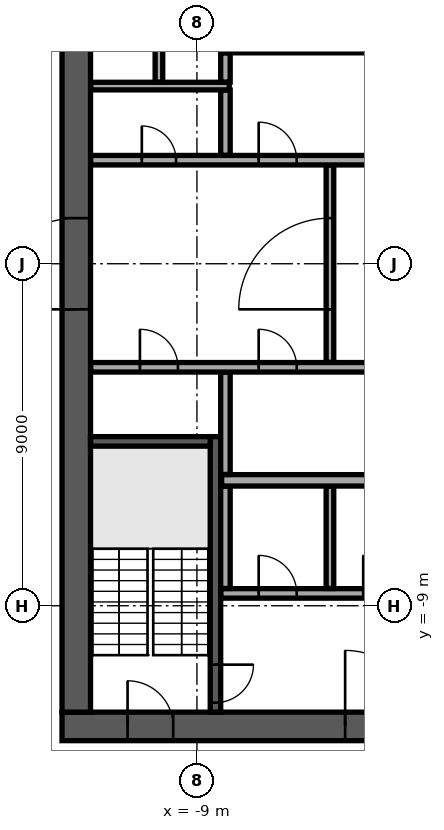
"""IFC4 building model, lengths in metres.
Left out: names, types, materials, properties, quantities, classifications, styles, units other than length and angle.
Written with IfcOpenShell. Run it as: python <this file> out.ifc"""

import sys

from ifc_helpers import new_model, si_unit, direction, frame, frame_2d, origin, place, context, subcontext, project, spatial, rectangle, extrude, element, fill, save


model = new_model("IFC4")
c1 = context("Model", 3, precision=1e-05, world=origin(), true_north=direction((0.0, 1.0)))
c2 = subcontext(c1, "Body", "Model", "MODEL_VIEW")
j1 = project(units=[si_unit("LENGTHUNIT", "METRE"), si_unit("PLANEANGLEUNIT", "RADIAN")], contexts=[c1])
p1 = place(None, origin())
s1 = spatial("IfcSite", under=j1, at=p1, CompositionType="ELEMENT")
p2 = place(p1, origin())
s2 = spatial("IfcBuilding", under=s1, at=p2, CompositionType="ELEMENT")
p3 = place(p2, frame((0.0, 0.0, 262.9)))
s3 = spatial("IfcBuildingStorey", under=s2, at=p3, CompositionType="ELEMENT", Elevation=262.9)
p4 = place(p3, frame((-12.55, -12.175, 0.0), z_axis=(0.0, 0.0, 1.0), x_axis=(1.0, 0.0, 0.0)))
e1 = element("IfcWall", 1, at=p4, inside=s3, PredefinedType="SHEAR", context=c2, shape_type="SweptSolid", body=[
    extrude(rectangle(XDim=25.1, YDim=0.75, at=frame_2d((12.55, 0.0))), origin(), (0.0, 0.0, 1.0), 3.64),
])
p5 = place(p4, frame((7.45, 0.0, 0.0)))
e2 = element("IfcOpeningElement", 2, at=p5, cuts=e1, PredefinedType="OPENING", context=c2, shape_type="SweptSolid", body=[
    extrude(rectangle(XDim=2.0, YDim=2.1, at=frame_2d((1.0, 1.05))), frame((0.0, 0.385, 0.0), z_axis=(0.0, -1.0, 0.0), x_axis=(1.0, 0.0, 0.0)), (0.0, 0.0, 1.0), 0.77),
])
p6 = place(p4, frame((17.575, 0.0, 0.0)))
e3 = element("IfcOpeningElement", 3, at=p6, cuts=e1, PredefinedType="OPENING", context=c2, shape_type="SweptSolid", body=[
    extrude(rectangle(XDim=1.2, YDim=2.1, at=frame_2d((0.6, 1.05))), frame((0.0, 0.385, 0.0), z_axis=(0.0, -1.0, 0.0), x_axis=(1.0, 0.0, 0.0)), (0.0, 0.0, 1.0), 0.77),
])
p7 = place(p4, frame((1.725, 0.0, 0.0)))
e4 = element("IfcOpeningElement", 4, at=p7, cuts=e1, PredefinedType="OPENING", context=c2, shape_type="SweptSolid", body=[
    extrude(rectangle(XDim=1.2, YDim=2.1, at=frame_2d((0.6, 1.05))), frame((0.0, 0.385, 0.0), z_axis=(0.0, -1.0, 0.0), x_axis=(1.0, 0.0, 0.0)), (0.0, 0.0, 1.0), 0.77),
])
p8 = place(p4, frame((22.175, 0.0, 0.0)))
e5 = element("IfcOpeningElement", 5, at=p8, cuts=e1, PredefinedType="OPENING", context=c2, shape_type="SweptSolid", body=[
    extrude(rectangle(XDim=1.2, YDim=2.1, at=frame_2d((0.6, 1.05))), frame((0.0, 0.385, 0.0), z_axis=(0.0, -1.0, 0.0), x_axis=(1.0, 0.0, 0.0)), (0.0, 0.0, 1.0), 0.77),
])
p9 = place(p3, frame((-12.175, -11.8, 0.0), z_axis=(0.0, 0.0, 1.0), x_axis=(0.0, 1.0, 0.0)))
e6 = element("IfcWall", 6, at=p9, inside=s3, PredefinedType="SHEAR", context=c2, shape_type="SweptSolid", body=[
    extrude(rectangle(XDim=23.6, YDim=0.75, at=frame_2d((11.8, 0.0))), origin(), (0.0, 0.0, 1.0), 3.64),
])
p10 = place(p9, frame((10.6, 0.0, 0.0)))
e7 = element("IfcOpeningElement", 7, at=p10, cuts=e6, PredefinedType="OPENING", context=c2, shape_type="SweptSolid", body=[
    extrude(rectangle(XDim=2.4, YDim=2.4, at=frame_2d((1.2, 1.2))), frame((0.0, 0.385, 0.0), z_axis=(0.0, -1.0, 0.0), x_axis=(1.0, 0.0, 0.0)), (0.0, 0.0, 1.0), 0.77),
])
p11 = place(p3, frame((-8.375, 5.7, 0.0), z_axis=(0.0, 0.0, 1.0), x_axis=(1.0, 0.0, 0.0)))
e8 = element("IfcWall", 8, at=p11, inside=s3, PredefinedType="SOLIDWALL", context=c2, shape_type="SweptSolid", body=[
    extrude(rectangle(XDim=16.75, YDim=0.3, at=frame_2d((8.375, 0.0))), origin(), (0.0, 0.0, 1.0), 3.64),
])
p12 = place(p3, frame((-8.512, -4.55, 0.0), z_axis=(0.0, 0.0, 1.0), x_axis=(0.0, -1.0, 0.0)))
e9 = element("IfcWall", 9, at=p12, inside=s3, PredefinedType="SOLIDWALL", context=c2, shape_type="SweptSolid", body=[
    extrude(rectangle(XDim=7.25, YDim=0.275, at=frame_2d((3.625, 0.0))), origin(), (0.0, 0.0, 1.0), 3.64),
])
p13 = place(p12, frame((6.0, 0.0, 0.0)))
e10 = element("IfcOpeningElement", 10, at=p13, cuts=e9, PredefinedType="OPENING", context=c2, shape_type="SweptSolid", body=[
    extrude(rectangle(XDim=1.0, YDim=2.1, at=frame_2d((0.5, 1.05))), frame((0.0, 0.147, 0.0), z_axis=(0.0, -1.0, 0.0), x_axis=(1.0, 0.0, 0.0)), (0.0, 0.0, 1.0), 0.295),
])
p14 = place(p3, frame((-8.65, -4.675, 0.0), z_axis=(0.0, 0.0, 1.0), x_axis=(-1.0, 0.0, 0.0)))
e11 = element("IfcWall", 11, at=p14, inside=s3, PredefinedType="SOLIDWALL", context=c2, shape_type="SweptSolid", body=[
    extrude(rectangle(XDim=3.15, YDim=0.25, at=frame_2d((1.575, 0.0))), origin(), (0.0, 0.0, 1.0), 3.64),
])
p15 = place(p3, frame((-8.37, -8.675, 0.0), z_axis=(0.0, 0.0, 1.0), x_axis=(1.0, 0.0, 0.0)))
e12 = element("IfcWall", 12, at=p15, inside=s3, PredefinedType="PARTITIONING", context=c2, shape_type="SweptSolid", body=[
    extrude(rectangle(XDim=5.49, YDim=0.25, at=frame_2d((2.745, 0.0))), origin(), (0.0, 0.0, 1.0), 3.64),
])
p16 = place(p15, frame((0.995, 0.0, 0.0)))
e13 = element("IfcOpeningElement", 13, at=p16, cuts=e12, PredefinedType="OPENING", context=c2, shape_type="SweptSolid", body=[
    extrude(rectangle(XDim=1.0, YDim=2.1, at=frame_2d((0.5, 1.05))), frame((0.0, 0.135, 0.0), z_axis=(0.0, -1.0, 0.0), x_axis=(1.0, 0.0, 0.0)), (0.0, 0.0, 1.0), 0.27),
])
p17 = place(p15, frame((3.745, 0.0, 0.0)))
e14 = element("IfcOpeningElement", 14, at=p17, cuts=e12, PredefinedType="OPENING", context=c2, shape_type="SweptSolid", body=[
    extrude(rectangle(XDim=1.0, YDim=2.1, at=frame_2d((0.5, 1.05))), frame((0.0, 0.135, 0.0), z_axis=(0.0, -1.0, 0.0), x_axis=(1.0, 0.0, 0.0)), (0.0, 0.0, 1.0), 0.27),
])
p18 = place(p3, frame((-8.25, -8.545, 0.0), z_axis=(0.0, 0.0, 1.0), x_axis=(0.0, 1.0, 0.0)))
e15 = element("IfcWall", 15, at=p18, inside=s3, PredefinedType="PARTITIONING", context=c2, shape_type="SweptSolid", body=[
    extrude(rectangle(XDim=2.69, YDim=0.25, at=frame_2d((1.345, 0.0))), origin(), (0.0, 0.0, 1.0), 3.64),
])
p19 = place(p3, frame((-5.5, -8.545, 0.0), z_axis=(0.0, 0.0, 1.0), x_axis=(0.0, 1.0, 0.0)))
e16 = element("IfcWall", 16, at=p19, inside=s3, PredefinedType="PARTITIONING", context=c2, shape_type="SweptSolid", body=[
    extrude(rectangle(XDim=2.69, YDim=0.2, at=frame_2d((1.345, 0.0))), origin(), (0.0, 0.0, 1.0), 3.64),
])
p20 = place(p3, frame((-8.35, -5.7, 0.0), z_axis=(0.0, 0.0, 1.0), x_axis=(1.0, 0.0, 0.0)))
e17 = element("IfcWall", 17, at=p20, inside=s3, PredefinedType="PARTITIONING", context=c2, shape_type="SweptSolid", body=[
    extrude(rectangle(XDim=5.47, YDim=0.3, at=frame_2d((2.735, 0.0))), origin(), (0.0, 0.0, 1.0), 3.64),
])
p21 = place(p3, frame((-8.25, -5.545, 0.0), z_axis=(0.0, 0.0, 1.0), x_axis=(0.0, 1.0, 0.0)))
e18 = element("IfcWall", 18, at=p21, inside=s3, PredefinedType="PARTITIONING", context=c2, shape_type="SweptSolid", body=[
    extrude(rectangle(XDim=2.69, YDim=0.25, at=frame_2d((1.345, 0.0))), origin(), (0.0, 0.0, 1.0), 3.64),
])
p22 = place(p3, frame((-11.795, -2.725, 0.0), z_axis=(0.0, 0.0, 1.0), x_axis=(1.0, 0.0, 0.0)))
e19 = element("IfcWall", 19, at=p22, inside=s3, PredefinedType="PARTITIONING", context=c2, shape_type="SweptSolid", body=[
    extrude(rectangle(XDim=14.415, YDim=0.25, at=frame_2d((7.208, 0.0))), origin(), (0.0, 0.0, 1.0), 3.64),
])
p23 = place(p22, frame((1.295, 0.0, 0.0)))
e20 = element("IfcOpeningElement", 20, at=p23, cuts=e19, PredefinedType="OPENING", context=c2, shape_type="SweptSolid", body=[
    extrude(rectangle(XDim=1.0, YDim=2.1, at=frame_2d((0.5, 1.05))), frame((0.0, 0.135, 0.0), z_axis=(0.0, -1.0, 0.0), x_axis=(1.0, 0.0, 0.0)), (0.0, 0.0, 1.0), 0.27),
])
p24 = place(p22, frame((4.42, 0.0, 0.0)))
e21 = element("IfcOpeningElement", 21, at=p24, cuts=e19, PredefinedType="OPENING", context=c2, shape_type="SweptSolid", body=[
    extrude(rectangle(XDim=1.0, YDim=2.1, at=frame_2d((0.5, 1.05))), frame((0.0, 0.135, 0.0), z_axis=(0.0, -1.0, 0.0), x_axis=(1.0, 0.0, 0.0)), (0.0, 0.0, 1.0), 0.27),
])
p25 = place(p22, frame((9.92, 0.0, 0.0)))
e22 = element("IfcOpeningElement", 22, at=p25, cuts=e19, PredefinedType="OPENING", context=c2, shape_type="SweptSolid", body=[
    extrude(rectangle(XDim=1.0, YDim=2.1, at=frame_2d((0.5, 1.05))), frame((0.0, 0.135, 0.0), z_axis=(0.0, -1.0, 0.0), x_axis=(1.0, 0.0, 0.0)), (0.0, 0.0, 1.0), 0.27),
])
p26 = place(p3, frame((-5.5, -2.595, 0.0), z_axis=(0.0, 0.0, 1.0), x_axis=(0.0, 1.0, 0.0)))
e23 = element("IfcWall", 23, at=p26, inside=s3, PredefinedType="PARTITIONING", context=c2, shape_type="SweptSolid", body=[
    extrude(rectangle(XDim=5.19, YDim=0.2, at=frame_2d((2.595, 0.0))), origin(), (0.0, 0.0, 1.0), 3.64),
])
p27 = place(p26, frame((1.395, 0.0, 0.0)))
e24 = element("IfcOpeningElement", 24, at=p27, cuts=e23, PredefinedType="OPENING", context=c2, shape_type="SweptSolid", body=[
    extrude(rectangle(XDim=2.4, YDim=2.4, at=frame_2d((1.2, 1.2))), frame((0.0, 0.11, 0.0), z_axis=(0.0, -1.0, 0.0), x_axis=(1.0, 0.0, 0.0)), (0.0, 0.0, 1.0), 0.22),
])
p28 = place(p3, frame((-11.795, 2.725, 0.0), z_axis=(0.0, 0.0, 1.0), x_axis=(1.0, 0.0, 0.0)))
e25 = element("IfcWall", 25, at=p28, inside=s3, PredefinedType="PARTITIONING", context=c2, shape_type="SweptSolid", body=[
    extrude(rectangle(XDim=23.59, YDim=0.25, at=frame_2d((11.795, 0.0))), origin(), (0.0, 0.0, 1.0), 3.64),
])
p29 = place(p28, frame((21.345, 0.0, 0.0)))
e26 = element("IfcOpeningElement", 26, at=p29, cuts=e25, PredefinedType="OPENING", context=c2, shape_type="SweptSolid", body=[
    extrude(rectangle(XDim=0.9, YDim=2.1, at=frame_2d((0.45, 1.05))), frame((0.0, 0.135, 0.0), z_axis=(0.0, -1.0, 0.0), x_axis=(1.0, 0.0, 0.0)), (0.0, 0.0, 1.0), 0.27),
])
p30 = place(p28, frame((1.345, 0.0, 0.0)))
e27 = element("IfcOpeningElement", 27, at=p30, cuts=e25, PredefinedType="OPENING", context=c2, shape_type="SweptSolid", body=[
    extrude(rectangle(XDim=0.9, YDim=2.1, at=frame_2d((0.45, 1.05))), frame((0.0, 0.135, 0.0), z_axis=(0.0, -1.0, 0.0), x_axis=(1.0, 0.0, 0.0)), (0.0, 0.0, 1.0), 0.27),
])
p31 = place(p28, frame((4.42, 0.0, 0.0)))
e28 = element("IfcOpeningElement", 28, at=p31, cuts=e25, PredefinedType="OPENING", context=c2, shape_type="SweptSolid", body=[
    extrude(rectangle(XDim=1.0, YDim=2.1, at=frame_2d((0.5, 1.05))), frame((0.0, 0.135, 0.0), z_axis=(0.0, -1.0, 0.0), x_axis=(1.0, 0.0, 0.0)), (0.0, 0.0, 1.0), 0.27),
])
p32 = place(p28, frame((9.82, 0.0, 0.0)))
e29 = element("IfcOpeningElement", 29, at=p32, cuts=e25, PredefinedType="OPENING", context=c2, shape_type="SweptSolid", body=[
    extrude(rectangle(XDim=1.2, YDim=2.1, at=frame_2d((0.6, 1.05))), frame((0.0, 0.135, 0.0), z_axis=(0.0, -1.0, 0.0), x_axis=(1.0, 0.0, 0.0)), (0.0, 0.0, 1.0), 0.27),
])
p33 = place(p3, frame((-8.25, 2.855, 0.0), z_axis=(0.0, 0.0, 1.0), x_axis=(0.0, 1.0, 0.0)))
e30 = element("IfcWall", 30, at=p33, inside=s3, PredefinedType="PARTITIONING", context=c2, shape_type="SweptSolid", body=[
    extrude(rectangle(XDim=1.715, YDim=0.25, at=frame_2d((0.857, 0.0))), origin(), (0.0, 0.0, 1.0), 3.64),
])
p34 = place(p3, frame((-11.795, 4.675, 0.0), z_axis=(0.0, 0.0, 1.0), x_axis=(1.0, 0.0, 0.0)))
e31 = element("IfcWall", 31, at=p34, inside=s3, PredefinedType="PARTITIONING", context=c2, shape_type="SweptSolid", body=[
    extrude(rectangle(XDim=3.645, YDim=0.2, at=frame_2d((1.823, 0.0))), origin(), (0.0, 0.0, 1.0), 3.64),
])
p35 = place(p3, frame((-10.0, 4.78, 0.0), z_axis=(0.0, 0.0, 1.0), x_axis=(0.0, 1.0, 0.0)))
e32 = element("IfcWall", 32, at=p35, inside=s3, PredefinedType="PARTITIONING", context=c2, shape_type="SweptSolid", body=[
    extrude(rectangle(XDim=7.015, YDim=0.2, at=frame_2d((3.507, 0.0))), origin(), (0.0, 0.0, 1.0), 3.64),
])
p36 = place(p35, frame((2.92, 0.0, 0.0)))
e33 = element("IfcOpeningElement", 33, at=p36, cuts=e32, PredefinedType="OPENING", context=c2, shape_type="SweptSolid", body=[
    extrude(rectangle(XDim=1.0, YDim=2.1, at=frame_2d((0.5, 1.05))), frame((0.0, 0.11, 0.0), z_axis=(0.0, -1.0, 0.0), x_axis=(1.0, 0.0, 0.0)), (0.0, 0.0, 1.0), 0.22),
])
p37 = place(p3, frame((-8.25, 4.78, 0.0), z_axis=(0.0, 0.0, 1.0), x_axis=(0.0, 1.0, 0.0)))
e34 = element("IfcWall", 34, at=p37, inside=s3, PredefinedType="PARTITIONING", context=c2, shape_type="SweptSolid", body=[
    extrude(rectangle(XDim=0.765, YDim=0.25, at=frame_2d((0.382, 0.0))), origin(), (0.0, 0.0, 1.0), 3.64),
])
p38 = place(p3, frame((-8.015, 32.917, 0.0), z_axis=(0.0, 0.0, 1.0), x_axis=(-0.500001675963, -0.866024436165, 0.0)))
e35 = element("IfcWall", 35, at=p38, inside=s3, PredefinedType="STANDARD", context=c2, shape_type="SweptSolid", body=[
    extrude(rectangle(XDim=48.843, YDim=0.6, at=frame_2d((24.421, 0.0))), origin(), (0.0, 0.0, 1.0), 3.64),
])
p39 = place(p38, frame((1.22, 0.0, 0.9)))
e36 = element("IfcOpeningElement", 36, at=p39, cuts=e35, PredefinedType="OPENING", context=c2, shape_type="SweptSolid", body=[
    extrude(rectangle(XDim=2.0, YDim=2.1, at=frame_2d((1.0, 1.05))), frame((0.0, 0.31, 0.0), z_axis=(0.0, -1.0, 0.0), x_axis=(1.0, 0.0, 0.0)), (0.0, 0.0, 1.0), 0.62),
])
p40 = place(p38, frame((5.66, 0.0, 0.9)))
e37 = element("IfcOpeningElement", 37, at=p40, cuts=e35, PredefinedType="OPENING", context=c2, shape_type="SweptSolid", body=[
    extrude(rectangle(XDim=2.0, YDim=2.1, at=frame_2d((1.0, 1.05))), frame((0.0, 0.31, 0.0), z_axis=(0.0, -1.0, 0.0), x_axis=(1.0, 0.0, 0.0)), (0.0, 0.0, 1.0), 0.62),
])
p41 = place(p38, frame((10.101, 0.0, 0.9)))
e38 = element("IfcOpeningElement", 38, at=p41, cuts=e35, PredefinedType="OPENING", context=c2, shape_type="SweptSolid", body=[
    extrude(rectangle(XDim=2.0, YDim=2.1, at=frame_2d((1.0, 1.05))), frame((0.0, 0.31, 0.0), z_axis=(0.0, -1.0, 0.0), x_axis=(1.0, 0.0, 0.0)), (0.0, 0.0, 1.0), 0.62),
])
p42 = place(p38, frame((14.541, 0.0, 0.9)))
e39 = element("IfcOpeningElement", 39, at=p42, cuts=e35, PredefinedType="OPENING", context=c2, shape_type="SweptSolid", body=[
    extrude(rectangle(XDim=2.0, YDim=2.1, at=frame_2d((1.0, 1.05))), frame((0.0, 0.31, 0.0), z_axis=(0.0, -1.0, 0.0), x_axis=(1.0, 0.0, 0.0)), (0.0, 0.0, 1.0), 0.62),
])
p43 = place(p38, frame((18.981, 0.0, 0.9)))
e40 = element("IfcOpeningElement", 40, at=p43, cuts=e35, PredefinedType="OPENING", context=c2, shape_type="SweptSolid", body=[
    extrude(rectangle(XDim=2.0, YDim=2.1, at=frame_2d((1.0, 1.05))), frame((0.0, 0.31, 0.0), z_axis=(0.0, -1.0, 0.0), x_axis=(1.0, 0.0, 0.0)), (0.0, 0.0, 1.0), 0.62),
])
p44 = place(p38, frame((23.422, 0.0, 0.9)))
e41 = element("IfcOpeningElement", 41, at=p44, cuts=e35, PredefinedType="OPENING", context=c2, shape_type="SweptSolid", body=[
    extrude(rectangle(XDim=2.0, YDim=2.1, at=frame_2d((1.0, 1.05))), frame((0.0, 0.31, 0.0), z_axis=(0.0, -1.0, 0.0), x_axis=(1.0, 0.0, 0.0)), (0.0, 0.0, 1.0), 0.62),
])
p45 = place(p38, frame((27.862, 0.0, 0.9)))
e42 = element("IfcOpeningElement", 42, at=p45, cuts=e35, PredefinedType="OPENING", context=c2, shape_type="SweptSolid", body=[
    extrude(rectangle(XDim=2.0, YDim=2.1, at=frame_2d((1.0, 1.05))), frame((0.0, 0.31, 0.0), z_axis=(0.0, -1.0, 0.0), x_axis=(1.0, 0.0, 0.0)), (0.0, 0.0, 1.0), 0.62),
])
p46 = place(p38, frame((32.302, 0.0, 0.9)))
e43 = element("IfcOpeningElement", 43, at=p46, cuts=e35, PredefinedType="OPENING", context=c2, shape_type="SweptSolid", body=[
    extrude(rectangle(XDim=2.0, YDim=2.1, at=frame_2d((1.0, 1.05))), frame((0.0, 0.31, 0.0), z_axis=(0.0, -1.0, 0.0), x_axis=(1.0, 0.0, 0.0)), (0.0, 0.0, 1.0), 0.62),
])
p47 = place(p38, frame((36.742, 0.0, 0.9)))
e44 = element("IfcOpeningElement", 44, at=p47, cuts=e35, PredefinedType="OPENING", context=c2, shape_type="SweptSolid", body=[
    extrude(rectangle(XDim=2.0, YDim=2.1, at=frame_2d((1.0, 1.05))), frame((0.0, 0.31, 0.0), z_axis=(0.0, -1.0, 0.0), x_axis=(1.0, 0.0, 0.0)), (0.0, 0.0, 1.0), 0.62),
])
p48 = place(p38, frame((41.183, 0.0, 0.9)))
e45 = element("IfcOpeningElement", 45, at=p48, cuts=e35, PredefinedType="OPENING", context=c2, shape_type="SweptSolid", body=[
    extrude(rectangle(XDim=2.0, YDim=2.1, at=frame_2d((1.0, 1.05))), frame((0.0, 0.31, 0.0), z_axis=(0.0, -1.0, 0.0), x_axis=(1.0, 0.0, 0.0)), (0.0, 0.0, 1.0), 0.62),
])
p49 = place(p38, frame((45.623, 0.0, 0.9)))
e46 = element("IfcOpeningElement", 46, at=p49, cuts=e35, PredefinedType="OPENING", context=c2, shape_type="SweptSolid", body=[
    extrude(rectangle(XDim=2.0, YDim=2.1, at=frame_2d((1.0, 1.05))), frame((0.0, 0.31, 0.0), z_axis=(0.0, -1.0, 0.0), x_axis=(1.0, 0.0, 0.0)), (0.0, 0.0, 1.0), 0.62),
])
p50 = place(p3, frame((-26.744, -7.073, 0.0), z_axis=(0.0, 0.0, 1.0), x_axis=(0.866020890374, -0.500007817374, 0.0)))
e47 = element("IfcWall", 47, at=p50, inside=s3, PredefinedType="PARTITIONING", context=c2, shape_type="SweptSolid", body=[
    extrude(rectangle(XDim=39.324, YDim=0.15, at=frame_2d((19.662, 0.0))), origin(), (0.0, 0.0, 1.0), 3.04),
])
p51 = place(p50, frame((14.505, 0.0, 0.0)))
e48 = element("IfcOpeningElement", 48, at=p51, cuts=e47, PredefinedType="OPENING", context=c2, shape_type="SweptSolid", body=[
    extrude(rectangle(XDim=1.0, YDim=2.1, at=frame_2d((0.5, 1.05))), frame((0.0, 0.085, 0.0), z_axis=(0.0, -1.0, 0.0), x_axis=(1.0, 0.0, 0.0)), (0.0, 0.0, 1.0), 0.17),
])
p52 = place(p50, frame((22.632, 0.0, 0.0)))
e49 = element("IfcOpeningElement", 49, at=p52, cuts=e47, PredefinedType="OPENING", context=c2, shape_type="SweptSolid", body=[
    extrude(rectangle(XDim=1.0, YDim=2.1, at=frame_2d((0.5, 1.05))), frame((0.0, 0.085, 0.0), z_axis=(0.0, -1.0, 0.0), x_axis=(1.0, 0.0, 0.0)), (0.0, 0.0, 1.0), 0.17),
])
p53 = place(p50, frame((36.852, 0.0, 0.0)))
e50 = element("IfcOpeningElement", 50, at=p53, cuts=e47, PredefinedType="OPENING", context=c2, shape_type="SweptSolid", body=[
    extrude(rectangle(XDim=1.8, YDim=2.1, at=frame_2d((0.9, 1.05))), frame((0.0, 0.085, 0.0), z_axis=(0.0, -1.0, 0.0), x_axis=(1.0, 0.0, 0.0)), (0.0, 0.0, 1.0), 0.17),
])
p54 = place(p50, frame((29.852, 0.0, 0.0)))
e51 = element("IfcOpeningElement", 51, at=p54, cuts=e47, PredefinedType="OPENING", context=c2, shape_type="SweptSolid", body=[
    extrude(rectangle(XDim=1.0, YDim=2.1, at=frame_2d((0.5, 1.05))), frame((0.0, 0.085, 0.0), z_axis=(0.0, -1.0, 0.0), x_axis=(1.0, 0.0, 0.0)), (0.0, 0.0, 1.0), 0.17),
])
p55 = place(p5, origin())
e52 = element("IfcDoor", 52, at=p55, inside=s3, OperationType="SINGLE_SWING_LEFT", PredefinedType="DOOR", context=c2, shape_type="SweptSolid", body=[
    extrude(rectangle(XDim=2.0, YDim=2.1, at=frame_2d((1.0, 1.05))), frame((0.0, 0.025, 0.0), z_axis=(0.0, -1.0, 0.0), x_axis=(1.0, 0.0, 0.0)), (0.0, 0.0, 1.0), 0.05),
])
fill(e2, e52)
p56 = place(p7, origin())
e53 = element("IfcDoor", 53, at=p56, inside=s3, OperationType="SINGLE_SWING_LEFT", PredefinedType="DOOR", context=c2, shape_type="SweptSolid", body=[
    extrude(rectangle(XDim=1.2, YDim=2.1, at=frame_2d((0.6, 1.05))), frame((0.0, 0.025, 0.0), z_axis=(0.0, -1.0, 0.0), x_axis=(1.0, 0.0, 0.0)), (0.0, 0.0, 1.0), 0.05),
])
fill(e4, e53)
p57 = place(p10, origin())
e54 = element("IfcDoor", 54, at=p57, inside=s3, OperationType="SINGLE_SWING_LEFT", PredefinedType="DOOR", context=c2, shape_type="SweptSolid", body=[
    extrude(rectangle(XDim=2.4, YDim=2.4, at=frame_2d((1.2, 1.2))), frame((0.0, 0.025, 0.0), z_axis=(0.0, -1.0, 0.0), x_axis=(1.0, 0.0, 0.0)), (0.0, 0.0, 1.0), 0.05),
])
fill(e7, e54)
p58 = place(p13, origin())
e55 = element("IfcDoor", 55, at=p58, inside=s3, OperationType="SINGLE_SWING_LEFT", PredefinedType="DOOR", context=c2, shape_type="SweptSolid", body=[
    extrude(rectangle(XDim=1.0, YDim=2.1, at=frame_2d((0.5, 1.05))), frame((0.0, 0.025, 0.0), z_axis=(0.0, -1.0, 0.0), x_axis=(1.0, 0.0, 0.0)), (0.0, 0.0, 1.0), 0.05),
])
fill(e10, e55)
p59 = place(p16, origin())
e56 = element("IfcDoor", 56, at=p59, inside=s3, OperationType="SINGLE_SWING_LEFT", PredefinedType="DOOR", context=c2, shape_type="SweptSolid", body=[
    extrude(rectangle(XDim=1.0, YDim=2.1, at=frame_2d((0.5, 1.05))), frame((0.0, 0.025, 0.0), z_axis=(0.0, -1.0, 0.0), x_axis=(1.0, 0.0, 0.0)), (0.0, 0.0, 1.0), 0.05),
])
fill(e13, e56)
p60 = place(p17, origin())
e57 = element("IfcDoor", 57, at=p60, inside=s3, OperationType="SINGLE_SWING_LEFT", PredefinedType="DOOR", context=c2, shape_type="SweptSolid", body=[
    extrude(rectangle(XDim=1.0, YDim=2.1, at=frame_2d((0.5, 1.05))), frame((0.0, 0.025, 0.0), z_axis=(0.0, -1.0, 0.0), x_axis=(1.0, 0.0, 0.0)), (0.0, 0.0, 1.0), 0.05),
])
fill(e14, e57)
p61 = place(p23, origin())
e58 = element("IfcDoor", 58, at=p61, inside=s3, OperationType="SINGLE_SWING_LEFT", PredefinedType="DOOR", context=c2, shape_type="SweptSolid", body=[
    extrude(rectangle(XDim=1.0, YDim=2.1, at=frame_2d((0.5, 1.05))), frame((0.0, 0.025, 0.0), z_axis=(0.0, -1.0, 0.0), x_axis=(1.0, 0.0, 0.0)), (0.0, 0.0, 1.0), 0.05),
])
fill(e20, e58)
p62 = place(p30, origin())
e59 = element("IfcDoor", 59, at=p62, inside=s3, OperationType="SINGLE_SWING_LEFT", PredefinedType="DOOR", context=c2, shape_type="SweptSolid", body=[
    extrude(rectangle(XDim=0.9, YDim=2.1, at=frame_2d((0.45, 1.05))), frame((0.0, 0.025, 0.0), z_axis=(0.0, -1.0, 0.0), x_axis=(1.0, 0.0, 0.0)), (0.0, 0.0, 1.0), 0.05),
])
fill(e27, e59)
p63 = place(p31, origin())
e60 = element("IfcDoor", 60, at=p63, inside=s3, OperationType="SINGLE_SWING_LEFT", PredefinedType="DOOR", context=c2, shape_type="SweptSolid", body=[
    extrude(rectangle(XDim=1.0, YDim=2.1, at=frame_2d((0.5, 1.05))), frame((0.0, 0.025, 0.0), z_axis=(0.0, -1.0, 0.0), x_axis=(1.0, 0.0, 0.0)), (0.0, 0.0, 1.0), 0.05),
])
fill(e28, e60)
p64 = place(p24, origin())
e61 = element("IfcDoor", 61, at=p64, inside=s3, OperationType="SINGLE_SWING_LEFT", PredefinedType="DOOR", context=c2, shape_type="SweptSolid", body=[
    extrude(rectangle(XDim=1.0, YDim=2.1, at=frame_2d((0.5, 1.05))), frame((0.0, 0.025, 0.0), z_axis=(0.0, -1.0, 0.0), x_axis=(1.0, 0.0, 0.0)), (0.0, 0.0, 1.0), 0.05),
])
fill(e21, e61)
p65 = place(p27, origin())
e62 = element("IfcDoor", 62, at=p65, inside=s3, OperationType="SINGLE_SWING_LEFT", PredefinedType="DOOR", context=c2, shape_type="SweptSolid", body=[
    extrude(rectangle(XDim=2.4, YDim=2.4, at=frame_2d((1.2, 1.2))), frame((0.0, 0.025, 0.0), z_axis=(0.0, -1.0, 0.0), x_axis=(1.0, 0.0, 0.0)), (0.0, 0.0, 1.0), 0.05),
])
fill(e24, e62)
save(model, sys.argv[1])
